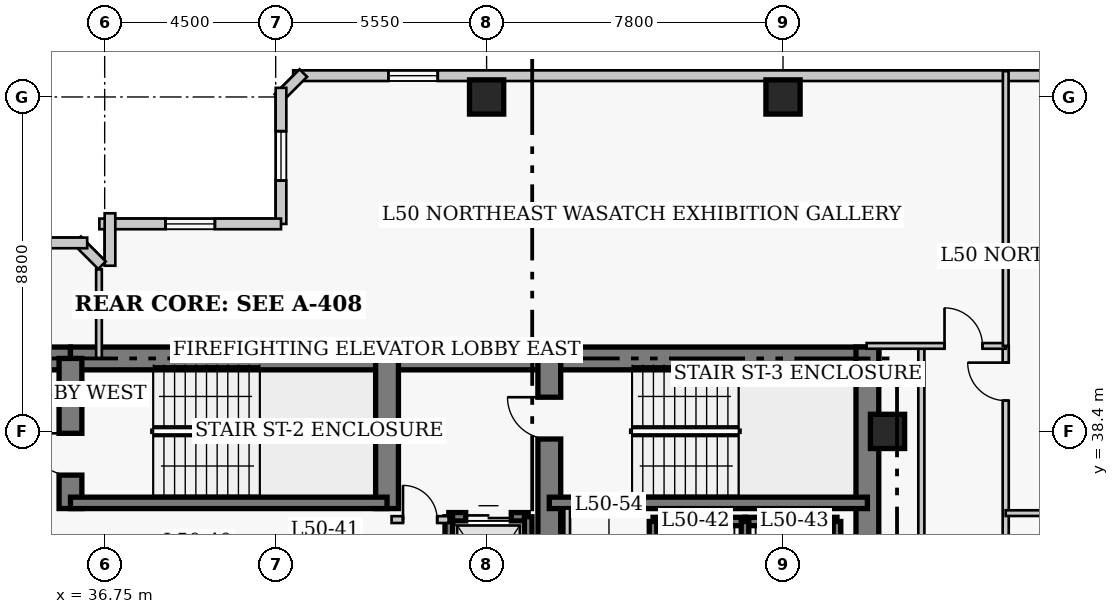
"""IFC4 building model, lengths in metres.
Left out: names, types, materials, properties, quantities, classifications, styles, units other than length and angle.
Written with IfcOpenShell. Run it as: python <this file> out.ifc"""

import sys

from ifc_helpers import new_model, si_unit, direction, frame, frame_2d, origin, origin_2d, place, context, subcontext, project, spatial, rectangle, extrude, element, fill, save


model = new_model("IFC4")
c1 = context("Model", 3, precision=1e-05, world=origin(), true_north=direction((0.0, 1.0)))
c2 = subcontext(c1, "Body", "Model", "MODEL_VIEW")
j1 = project(units=[si_unit("LENGTHUNIT", "METRE"), si_unit("PLANEANGLEUNIT", "RADIAN")], contexts=[c1])
p1 = place(None, origin())
s1 = spatial("IfcSite", under=j1, at=p1, CompositionType="ELEMENT")
p2 = place(p1, origin())
s2 = spatial("IfcBuilding", under=s1, at=p2, CompositionType="ELEMENT")
p3 = place(p2, frame((0.0, 0.0, 200.7)))
s3 = spatial("IfcBuildingStorey", under=s2, at=p3, CompositionType="ELEMENT", Elevation=200.7)
p4 = place(p3, frame((21.6, 40.32, 0.0), z_axis=(0.0, 0.0, 1.0), x_axis=(1.0, 0.0, 0.0)))
e1 = element("IfcWall", 1, at=p4, inside=s3, PredefinedType="SHEAR", context=c2, shape_type="SweptSolid", body=[
    extrude(rectangle(XDim=14.25, YDim=0.6, at=frame_2d((7.125, 0.0))), origin(), (0.0, 0.0, 1.0), 3.9),
])
p5 = place(p3, frame((35.85, 40.32, 0.0), z_axis=(0.0, 0.0, 1.0), x_axis=(1.0, 0.0, 0.0)))
e2 = element("IfcWall", 2, at=p5, inside=s3, PredefinedType="SHEAR", context=c2, shape_type="SweptSolid", body=[
    extrude(rectangle(XDim=12.6, YDim=0.6, at=frame_2d((6.3, 0.0))), origin(), (0.0, 0.0, 1.0), 3.9),
])
p6 = place(p3, frame((48.45, 40.32, 0.0), z_axis=(0.0, 0.0, 1.0), x_axis=(1.0, 0.0, 0.0)))
e3 = element("IfcWall", 3, at=p6, inside=s3, PredefinedType="SHEAR", context=c2, shape_type="SweptSolid", body=[
    extrude(rectangle(XDim=8.67, YDim=0.6, at=frame_2d((4.335, 0.0))), origin(), (0.0, 0.0, 1.0), 3.9),
])
p7 = place(p3, frame((56.82, 27.05, 0.0), z_axis=(0.0, 0.0, 1.0), x_axis=(0.0, 1.0, 0.0)))
e4 = element("IfcWall", 4, at=p7, inside=s3, PredefinedType="SHEAR", context=c2, shape_type="SweptSolid", body=[
    extrude(rectangle(XDim=13.57, YDim=0.6, at=frame_2d((6.785, 0.0))), origin(), (0.0, 0.0, 1.0), 3.9),
])
p8 = place(p3, frame((35.85, 36.37, 0.0), z_axis=(0.0, 0.0, 1.0), x_axis=(0.0, 1.0, 0.0)))
e5 = element("IfcWall", 5, at=p8, inside=s3, PredefinedType="SHEAR", context=c2, shape_type="SweptSolid", body=[
    extrude(rectangle(XDim=3.95, YDim=0.6, at=frame_2d((1.975, 0.0))), origin(), (0.0, 0.0, 1.0), 3.9),
])
p9 = place(p8, frame((0.88, 0.0, 0.0)))
e6 = element("IfcOpeningElement", 6, at=p9, cuts=e5, PredefinedType="OPENING", context=c2, shape_type="SweptSolid", body=[
    extrude(rectangle(XDim=1.1, YDim=2.15, at=frame_2d((0.55, 1.075))), frame((0.0, 0.31, 0.0), z_axis=(0.0, -1.0, 0.0), x_axis=(1.0, 0.0, 0.0)), (0.0, 0.0, 1.0), 0.62),
])
p10 = place(p3, frame((44.18, 36.37, 0.0), z_axis=(0.0, 0.0, 1.0), x_axis=(0.0, 1.0, 0.0)))
e7 = element("IfcWall", 7, at=p10, inside=s3, PredefinedType="SHEAR", context=c2, shape_type="SweptSolid", body=[
    extrude(rectangle(XDim=3.95, YDim=0.6, at=frame_2d((1.975, 0.0))), origin(), (0.0, 0.0, 1.0), 3.9),
])
p11 = place(p3, frame((48.45, 32.45, 0.0), z_axis=(0.0, 0.0, 1.0), x_axis=(0.0, 1.0, 0.0)))
e8 = element("IfcWall", 8, at=p11, inside=s3, PredefinedType="SHEAR", context=c2, shape_type="SweptSolid", body=[
    extrude(rectangle(XDim=7.87, YDim=0.6, at=frame_2d((3.935, 0.0))), origin(), (0.0, 0.0, 1.0), 3.9),
])
p12 = place(p11, frame((5.75, 0.0, 0.0)))
e9 = element("IfcOpeningElement", 9, at=p12, cuts=e8, PredefinedType="OPENING", context=c2, shape_type="SweptSolid", body=[
    extrude(rectangle(XDim=1.1, YDim=2.15, at=frame_2d((0.55, 1.075))), frame((0.0, 0.31, 0.0), z_axis=(0.0, -1.0, 0.0), x_axis=(1.0, 0.0, 0.0)), (0.0, 0.0, 1.0), 0.62),
])
p13 = place(p3, frame((35.85, 36.52, 0.0), z_axis=(0.0, 0.0, 1.0), x_axis=(1.0, 0.0, 0.0)))
e10 = element("IfcWall", 10, at=p13, inside=s3, PredefinedType="SHEAR", context=c2, shape_type="SweptSolid", body=[
    extrude(rectangle(XDim=8.33, YDim=0.3, at=frame_2d((4.165, 0.0))), origin(), (0.0, 0.0, 1.0), 3.9),
])
p14 = place(p3, frame((48.45, 36.52, 0.0), z_axis=(0.0, 0.0, 1.0), x_axis=(1.0, 0.0, 0.0)))
e11 = element("IfcWall", 11, at=p14, inside=s3, PredefinedType="SHEAR", context=c2, shape_type="SweptSolid", body=[
    extrude(rectangle(XDim=8.37, YDim=0.3, at=frame_2d((4.185, 0.0))), origin(), (0.0, 0.0, 1.0), 3.9),
])
for number, where, z_axis, x_axis in (
    (12, (46.8, 47.2, 0.0), (0.0, 0.0, 1.0), (1.0, 0.0, 0.0)),
    (13, (54.6, 47.2, 0.0), (0.0, 0.0, 1.0), (1.0, 0.0, 0.0)),
    (14, (57.35, 38.4, 0.0), (0.0, 0.0, 1.0), (1.0, 0.0, 0.0)),
):
    element("IfcColumn", number, at=place(p3, frame(where, z_axis=z_axis, x_axis=x_axis)), inside=s3, PredefinedType="COLUMN", context=c2, shape_type="SweptSolid", body=[
        extrude(rectangle(XDim=0.9, YDim=0.9, at=origin_2d()), origin(), (0.0, 0.0, 1.0), 3.9),
    ])
p15 = place(p3, frame((67.54, 47.76, 0.0), z_axis=(0.0, 0.0, 1.0), x_axis=(-1.0, 0.0, 0.0)))
e15 = element("IfcWall", 15, at=p15, inside=s3, PredefinedType="SOLIDWALL", context=c2, shape_type="SweptSolid", body=[
    extrude(rectangle(XDim=25.83, YDim=0.28, at=frame_2d((12.915, 0.0))), origin(), (0.0, 0.0, 1.0), 3.65),
])
p16 = place(p15, frame((3.655, 0.0, 0.85)))
e16 = element("IfcOpeningElement", 16, at=p16, cuts=e15, PredefinedType="OPENING", context=c2, shape_type="SweptSolid", body=[
    extrude(rectangle(XDim=1.3, YDim=1.7, at=frame_2d((0.65, 0.85))), frame((0.0, 0.15, 0.0), z_axis=(0.0, -1.0, 0.0), x_axis=(1.0, 0.0, 0.0)), (0.0, 0.0, 1.0), 0.3),
])
p17 = place(p15, frame((22.025, 0.0, 0.85)))
e17 = element("IfcOpeningElement", 17, at=p17, cuts=e15, PredefinedType="OPENING", context=c2, shape_type="SweptSolid", body=[
    extrude(rectangle(XDim=1.3, YDim=1.7, at=frame_2d((0.65, 0.85))), frame((0.0, 0.15, 0.0), z_axis=(0.0, -1.0, 0.0), x_axis=(1.0, 0.0, 0.0)), (0.0, 0.0, 1.0), 0.3),
])
p18 = place(p3, frame((41.977, 47.829, 0.0), z_axis=(0.0, 0.0, 1.0), x_axis=(-0.706975312048, -0.707238225886, 0.0)))
e18 = element("IfcWall", 18, at=p18, inside=s3, PredefinedType="SOLIDWALL", context=c2, shape_type="SweptSolid", body=[
    extrude(rectangle(XDim=0.929, YDim=0.28, at=frame_2d((0.464, 0.0))), origin(), (0.0, 0.0, 1.0), 3.65),
])
p19 = place(p3, frame((41.39, 47.44, 0.0), z_axis=(0.0, 0.0, 1.0), x_axis=(0.0, -1.0, 0.0)))
e19 = element("IfcWall", 19, at=p19, inside=s3, PredefinedType="SOLIDWALL", context=c2, shape_type="SweptSolid", body=[
    extrude(rectangle(XDim=3.58, YDim=0.28, at=frame_2d((1.79, 0.0))), origin(), (0.0, 0.0, 1.0), 3.65),
])
p20 = place(p19, frame((1.14, 0.0, 0.85)))
e20 = element("IfcOpeningElement", 20, at=p20, cuts=e19, PredefinedType="OPENING", context=c2, shape_type="SweptSolid", body=[
    extrude(rectangle(XDim=1.3, YDim=1.7, at=frame_2d((0.65, 0.85))), frame((0.0, 0.15, 0.0), z_axis=(0.0, -1.0, 0.0), x_axis=(1.0, 0.0, 0.0)), (0.0, 0.0, 1.0), 0.3),
])
p21 = place(p3, frame((41.39, 43.86, 0.0), z_axis=(0.0, 0.0, 1.0), x_axis=(-1.0, 0.0, 0.0)))
e21 = element("IfcWall", 21, at=p21, inside=s3, PredefinedType="SOLIDWALL", context=c2, shape_type="SweptSolid", body=[
    extrude(rectangle(XDim=4.78, YDim=0.28, at=frame_2d((2.39, 0.0))), origin(), (0.0, 0.0, 1.0), 3.65),
])
p22 = place(p21, frame((1.74, 0.0, 0.85)))
e22 = element("IfcOpeningElement", 22, at=p22, cuts=e21, PredefinedType="OPENING", context=c2, shape_type="SweptSolid", body=[
    extrude(rectangle(XDim=1.3, YDim=1.7, at=frame_2d((0.65, 0.85))), frame((0.0, 0.15, 0.0), z_axis=(0.0, -1.0, 0.0), x_axis=(1.0, 0.0, 0.0)), (0.0, 0.0, 1.0), 0.3),
])
p23 = place(p3, frame((36.89, 44.14, 0.0), z_axis=(0.0, 0.0, 1.0), x_axis=(0.0, -1.0, 0.0)))
e23 = element("IfcWall", 23, at=p23, inside=s3, PredefinedType="SOLIDWALL", context=c2, shape_type="SweptSolid", body=[
    extrude(rectangle(XDim=1.38, YDim=0.28, at=frame_2d((0.69, 0.0))), origin(), (0.0, 0.0, 1.0), 3.65),
])
p24 = place(p3, frame((36.679, 42.773, 0.0), z_axis=(0.0, 0.0, 1.0), x_axis=(-0.707106781187, 0.707106781187, 0.0)))
e24 = element("IfcWall", 24, at=p24, inside=s3, PredefinedType="SOLIDWALL", context=c2, shape_type="SweptSolid", body=[
    extrude(rectangle(XDim=0.928, YDim=0.28, at=frame_2d((0.464, 0.0))), origin(), (0.0, 0.0, 1.0), 3.65),
])
p25 = place(p3, frame((36.29, 43.36, 0.0), z_axis=(0.0, 0.0, 1.0), x_axis=(-1.0, 0.0, 0.0)))
e25 = element("IfcWall", 25, at=p25, inside=s3, PredefinedType="SOLIDWALL", context=c2, shape_type="SweptSolid", body=[
    extrude(rectangle(XDim=25.83, YDim=0.28, at=frame_2d((12.915, 0.0))), origin(), (0.0, 0.0, 1.0), 3.65),
])
p26 = place(p25, frame((3.005, 0.0, 0.85)))
e26 = element("IfcOpeningElement", 26, at=p26, cuts=e25, PredefinedType="OPENING", context=c2, shape_type="SweptSolid", body=[
    extrude(rectangle(XDim=1.3, YDim=1.7, at=frame_2d((0.65, 0.85))), frame((0.0, 0.15, 0.0), z_axis=(0.0, -1.0, 0.0), x_axis=(1.0, 0.0, 0.0)), (0.0, 0.0, 1.0), 0.3),
])
p27 = place(p25, frame((12.265, 0.0, 0.85)))
e27 = element("IfcOpeningElement", 27, at=p27, cuts=e25, PredefinedType="OPENING", context=c2, shape_type="SweptSolid", body=[
    extrude(rectangle(XDim=1.3, YDim=1.7, at=frame_2d((0.65, 0.85))), frame((0.0, 0.15, 0.0), z_axis=(0.0, -1.0, 0.0), x_axis=(1.0, 0.0, 0.0)), (0.0, 0.0, 1.0), 0.3),
])
p28 = place(p25, frame((20.875, 0.0, 0.85)))
e28 = element("IfcOpeningElement", 28, at=p28, cuts=e25, PredefinedType="OPENING", context=c2, shape_type="SweptSolid", body=[
    extrude(rectangle(XDim=1.3, YDim=1.7, at=frame_2d((0.65, 0.85))), frame((0.0, 0.15, 0.0), z_axis=(0.0, -1.0, 0.0), x_axis=(1.0, 0.0, 0.0)), (0.0, 0.0, 1.0), 0.3),
])
p29 = place(p3, frame((51.18, 36.03, 0.0), z_axis=(0.0, 0.0, 1.0), x_axis=(1.0, 0.0, 0.0)))
e29 = element("IfcWall", 29, at=p29, inside=s3, PredefinedType="SHEAR", context=c2, shape_type="SweptSolid", body=[
    extrude(rectangle(XDim=2.42, YDim=0.22, at=frame_2d((1.21, 0.0))), origin(), (0.0, 0.0, 1.0), 3.9),
])
p30 = place(p3, frame((51.18, 33.17, 0.0), z_axis=(0.0, 0.0, 1.0), x_axis=(0.0, 1.0, 0.0)))
e30 = element("IfcWall", 30, at=p30, inside=s3, PredefinedType="SHEAR", context=c2, shape_type="SweptSolid", body=[
    extrude(rectangle(XDim=2.86, YDim=0.2, at=frame_2d((1.43, 0.0))), origin(), (0.0, 0.0, 1.0), 3.9),
])
p31 = place(p3, frame((53.6, 36.03, 0.0), z_axis=(0.0, 0.0, 1.0), x_axis=(1.0, 0.0, 0.0)))
e31 = element("IfcWall", 31, at=p31, inside=s3, PredefinedType="SHEAR", context=c2, shape_type="SweptSolid", body=[
    extrude(rectangle(XDim=2.42, YDim=0.22, at=frame_2d((1.21, 0.0))), origin(), (0.0, 0.0, 1.0), 3.9),
])
for number, where, z_axis, x_axis in (
    (32, (53.6, 33.17, 0.0), (0.0, 0.0, 1.0), (0.0, 1.0, 0.0)),
    (33, (56.02, 33.17, 0.0), (0.0, 0.0, 1.0), (0.0, 1.0, 0.0)),
):
    element("IfcWall", number, at=place(p3, frame(where, z_axis=z_axis, x_axis=x_axis)), inside=s3, PredefinedType="SHEAR", context=c2, shape_type="SweptSolid", body=[
        extrude(rectangle(XDim=2.86, YDim=0.2, at=frame_2d((1.43, 0.0))), origin(), (0.0, 0.0, 1.0), 3.9),
    ])
p32 = place(p3, frame((45.805, 36.155, 0.0), z_axis=(0.0, 0.0, 1.0), x_axis=(1.0, 0.0, 0.0)))
e34 = element("IfcWall", 34, at=p32, inside=s3, PredefinedType="SHEAR", context=c2, shape_type="SweptSolid", body=[
    extrude(rectangle(XDim=2.09, YDim=0.22, at=frame_2d((1.045, 0.0))), origin(), (0.0, 0.0, 1.0), 3.9),
])
p33 = place(p32, frame((0.445, 0.0, 0.0)))
e35 = element("IfcOpeningElement", 35, at=p33, cuts=e34, PredefinedType="OPENING", context=c2, shape_type="SweptSolid", body=[
    extrude(rectangle(XDim=1.2, YDim=2.15, at=frame_2d((0.6, 1.075))), frame((0.0, 0.12, 0.0), z_axis=(0.0, -1.0, 0.0), x_axis=(1.0, 0.0, 0.0)), (0.0, 0.0, 1.0), 0.24),
])
p34 = place(p3, frame((45.805, 32.65, 0.0), z_axis=(0.0, 0.0, 1.0), x_axis=(0.0, 1.0, 0.0)))
e36 = element("IfcWall", 36, at=p34, inside=s3, PredefinedType="SHEAR", context=c2, shape_type="SweptSolid", body=[
    extrude(rectangle(XDim=3.505, YDim=0.2, at=frame_2d((1.752, 0.0))), origin(), (0.0, 0.0, 1.0), 3.9),
])
p35 = place(p3, frame((47.895, 33.245, 0.0), z_axis=(0.0, 0.0, 1.0), x_axis=(0.0, 1.0, 0.0)))
e37 = element("IfcWall", 37, at=p35, inside=s3, PredefinedType="SHEAR", context=c2, shape_type="SweptSolid", body=[
    extrude(rectangle(XDim=2.91, YDim=0.2, at=frame_2d((1.455, 0.0))), origin(), (0.0, 0.0, 1.0), 3.9),
])
p36 = place(p3, frame((44.3, 36.08, 0.0), z_axis=(0.0, 0.0, 1.0), x_axis=(1.0, 0.0, 0.0)))
e38 = element("IfcWall", 38, at=p36, inside=s3, PredefinedType="PARTITIONING", context=c2, shape_type="SweptSolid", body=[
    extrude(rectangle(XDim=1.5, YDim=0.18, at=frame_2d((0.75, 0.0))), origin(), (0.0, 0.0, 1.0), 3.65),
])
p37 = place(p36, frame((0.3, 0.0, 0.0)))
e39 = element("IfcOpeningElement", 39, at=p37, cuts=e38, PredefinedType="OPENING", context=c2, shape_type="SweptSolid", body=[
    extrude(rectangle(XDim=0.9, YDim=2.15, at=frame_2d((0.45, 1.075))), frame((0.0, 0.1, 0.0), z_axis=(0.0, -1.0, 0.0), x_axis=(1.0, 0.0, 0.0)), (0.0, 0.0, 1.0), 0.2),
])
p38 = place(p3, frame((48.92, 32.75, 0.0), z_axis=(0.0, 0.0, 1.0), x_axis=(0.0, 1.0, 0.0)))
e40 = element("IfcWall", 40, at=p38, inside=s3, PredefinedType="PARTITIONING", context=c2, shape_type="SweptSolid", body=[
    extrude(rectangle(XDim=3.62, YDim=0.15, at=frame_2d((1.81, 0.0))), origin(), (0.0, 0.0, 1.0), 3.65),
])
p39 = place(p3, frame((60.46, 11.95, 0.0), z_axis=(0.0, 0.0, 1.0), x_axis=(0.0, 1.0, 0.0)))
e41 = element("IfcWall", 41, at=p39, inside=s3, PredefinedType="PARTITIONING", context=c2, shape_type="SweptSolid", body=[
    extrude(rectangle(XDim=28.7, YDim=0.16, at=frame_2d((14.35, 0.0))), origin(), (0.0, 0.0, 1.0), 3.65),
])
p40 = place(p39, frame((0.46, 0.0, 0.0)))
e42 = element("IfcOpeningElement", 42, at=p40, cuts=e41, PredefinedType="OPENING", context=c2, shape_type="SweptSolid", body=[
    extrude(rectangle(XDim=0.95, YDim=2.1, at=frame_2d((0.475, 1.05))), frame((0.0, 0.09, 0.0), z_axis=(0.0, -1.0, 0.0), x_axis=(1.0, 0.0, 0.0)), (0.0, 0.0, 1.0), 0.18),
])
p41 = place(p39, frame((20.1, 0.0, 0.0)))
e43 = element("IfcOpeningElement", 43, at=p41, cuts=e41, PredefinedType="OPENING", context=c2, shape_type="SweptSolid", body=[
    extrude(rectangle(XDim=0.95, YDim=2.1, at=frame_2d((0.475, 1.05))), frame((0.0, 0.09, 0.0), z_axis=(0.0, -1.0, 0.0), x_axis=(1.0, 0.0, 0.0)), (0.0, 0.0, 1.0), 0.18),
])
p42 = place(p39, frame((27.26, 0.0, 0.0)))
e44 = element("IfcOpeningElement", 44, at=p42, cuts=e41, PredefinedType="OPENING", context=c2, shape_type="SweptSolid", body=[
    extrude(rectangle(XDim=1.0, YDim=2.15, at=frame_2d((0.5, 1.075))), frame((0.0, 0.09, 0.0), z_axis=(0.0, -1.0, 0.0), x_axis=(1.0, 0.0, 0.0)), (0.0, 0.0, 1.0), 0.18),
])
p43 = place(p3, frame((58.24, 18.51, 0.0), z_axis=(0.0, 0.0, 1.0), x_axis=(0.0, 1.0, 0.0)))
e45 = element("IfcWall", 45, at=p43, inside=s3, PredefinedType="PARTITIONING", context=c2, shape_type="SweptSolid", body=[
    extrude(rectangle(XDim=22.14, YDim=0.16, at=frame_2d((11.07, 0.0))), origin(), (0.0, 0.0, 1.0), 3.65),
])
p44 = place(p3, frame((56.8, 40.65, 0.0), z_axis=(0.0, 0.0, 1.0), x_axis=(1.0, 0.0, 0.0)))
e46 = element("IfcWall", 46, at=p44, inside=s3, PredefinedType="PARTITIONING", context=c2, shape_type="SweptSolid", body=[
    extrude(rectangle(XDim=3.66, YDim=0.15, at=frame_2d((1.83, 0.0))), origin(), (0.0, 0.0, 1.0), 3.65),
])
p45 = place(p44, frame((2.05, 0.0, 0.0)))
e47 = element("IfcOpeningElement", 47, at=p45, cuts=e46, PredefinedType="OPENING", context=c2, shape_type="SweptSolid", body=[
    extrude(rectangle(XDim=1.0, YDim=2.15, at=frame_2d((0.5, 1.075))), frame((0.0, 0.085, 0.0), z_axis=(0.0, -1.0, 0.0), x_axis=(1.0, 0.0, 0.0)), (0.0, 0.0, 1.0), 0.17),
])
p46 = place(p3, frame((36.6, 40.32, 0.0), z_axis=(0.0, 0.0, 1.0), x_axis=(0.0, 1.0, 0.0)))
e48 = element("IfcWall", 48, at=p46, inside=s3, PredefinedType="PARTITIONING", context=c2, shape_type="SweptSolid", body=[
    extrude(rectangle(XDim=2.345, YDim=0.15, at=frame_2d((1.172, 0.0))), origin(), (0.0, 0.0, 1.0), 3.65),
])
p47 = place(p3, frame((60.46, 40.65, 0.0), z_axis=(0.0, 0.0, 1.0), x_axis=(0.0, 1.0, 0.0)))
e49 = element("IfcWall", 49, at=p47, inside=s3, PredefinedType="PARTITIONING", context=c2, shape_type="SweptSolid", body=[
    extrude(rectangle(XDim=7.23, YDim=0.15, at=frame_2d((3.615, 0.0))), origin(), (0.0, 0.0, 1.0), 3.65),
])
p48 = place(p3, frame((60.46, 36.25, 0.0), z_axis=(0.0, 0.0, 1.0), x_axis=(1.0, 0.0, 0.0)))
e50 = element("IfcWall", 50, at=p48, inside=s3, PredefinedType="PARTITIONING", context=c2, shape_type="SweptSolid", body=[
    extrude(rectangle(XDim=4.64, YDim=0.15, at=frame_2d((2.32, 0.0))), origin(), (0.0, 0.0, 1.0), 3.65),
])
p49 = place(p17, origin())
e51 = element("IfcWindow", 51, at=p49, inside=s3, PartitioningType="SINGLE_PANEL", PredefinedType="WINDOW", context=c2, shape_type="SweptSolid", body=[
    extrude(rectangle(XDim=1.3, YDim=1.7, at=frame_2d((0.65, 0.85))), frame((0.0, 0.03, 0.0), z_axis=(0.0, -1.0, 0.0), x_axis=(1.0, 0.0, 0.0)), (0.0, 0.0, 1.0), 0.06),
])
fill(e17, e51)
p50 = place(p20, origin())
e52 = element("IfcWindow", 52, at=p50, inside=s3, PartitioningType="SINGLE_PANEL", PredefinedType="WINDOW", context=c2, shape_type="SweptSolid", body=[
    extrude(rectangle(XDim=1.3, YDim=1.7, at=frame_2d((0.65, 0.85))), frame((0.0, 0.03, 0.0), z_axis=(0.0, -1.0, 0.0), x_axis=(1.0, 0.0, 0.0)), (0.0, 0.0, 1.0), 0.06),
])
fill(e20, e52)
p51 = place(p22, origin())
e53 = element("IfcWindow", 53, at=p51, inside=s3, PartitioningType="SINGLE_PANEL", PredefinedType="WINDOW", context=c2, shape_type="SweptSolid", body=[
    extrude(rectangle(XDim=1.3, YDim=1.7, at=frame_2d((0.65, 0.85))), frame((0.0, 0.03, 0.0), z_axis=(0.0, -1.0, 0.0), x_axis=(1.0, 0.0, 0.0)), (0.0, 0.0, 1.0), 0.06),
])
fill(e22, e53)
p52 = place(p33, origin())
e54 = element("IfcDoor", 54, at=p52, inside=s3, OperationType="DOUBLE_DOOR_SLIDING", PredefinedType="DOOR", context=c2, shape_type="SweptSolid", body=[
    extrude(rectangle(XDim=1.2, YDim=2.15, at=frame_2d((0.6, 1.075))), frame((0.0, 0.025, 0.0), z_axis=(0.0, -1.0, 0.0), x_axis=(1.0, 0.0, 0.0)), (0.0, 0.0, 1.0), 0.05),
])
fill(e35, e54)
p53 = place(p37, origin())
e55 = element("IfcDoor", 55, at=p53, inside=s3, OperationType="SINGLE_SWING_LEFT", PredefinedType="DOOR", context=c2, shape_type="SweptSolid", body=[
    extrude(rectangle(XDim=0.9, YDim=2.15, at=frame_2d((0.45, 1.075))), frame((0.0, 0.025, 0.0), z_axis=(0.0, -1.0, 0.0), x_axis=(1.0, 0.0, 0.0)), (0.0, 0.0, 1.0), 0.05),
])
fill(e39, e55)
p54 = place(p45, origin())
e56 = element("IfcDoor", 56, at=p54, inside=s3, OperationType="SINGLE_SWING_LEFT", PredefinedType="DOOR", context=c2, shape_type="SweptSolid", body=[
    extrude(rectangle(XDim=1.0, YDim=2.15, at=frame_2d((0.5, 1.075))), frame((0.0, 0.025, 0.0), z_axis=(0.0, -1.0, 0.0), x_axis=(1.0, 0.0, 0.0)), (0.0, 0.0, 1.0), 0.05),
])
fill(e47, e56)
p55 = place(p42, origin())
e57 = element("IfcDoor", 57, at=p55, inside=s3, OperationType="SINGLE_SWING_RIGHT", PredefinedType="DOOR", context=c2, shape_type="SweptSolid", body=[
    extrude(rectangle(XDim=1.0, YDim=2.15, at=frame_2d((0.5, 1.075))), frame((0.0, 0.025, 0.0), z_axis=(0.0, -1.0, 0.0), x_axis=(1.0, 0.0, 0.0)), (0.0, 0.0, 1.0), 0.05),
])
fill(e44, e57)
p56 = place(p9, origin())
e58 = element("IfcDoor", 58, at=p56, inside=s3, OperationType="SINGLE_SWING_RIGHT", PredefinedType="DOOR", context=c2, shape_type="SweptSolid", body=[
    extrude(rectangle(XDim=1.1, YDim=2.15, at=frame_2d((0.55, 1.075))), frame((0.0, 0.025, 0.0), z_axis=(0.0, -1.0, 0.0), x_axis=(1.0, 0.0, 0.0)), (0.0, 0.0, 1.0), 0.05),
])
fill(e6, e58)
p57 = place(p12, origin())
e59 = element("IfcDoor", 59, at=p57, inside=s3, OperationType="SINGLE_SWING_RIGHT", PredefinedType="DOOR", context=c2, shape_type="SweptSolid", body=[
    extrude(rectangle(XDim=1.1, YDim=2.15, at=frame_2d((0.55, 1.075))), frame((0.0, 0.025, 0.0), z_axis=(0.0, -1.0, 0.0), x_axis=(1.0, 0.0, 0.0)), (0.0, 0.0, 1.0), 0.05),
])
fill(e9, e59)
save(model, sys.argv[1])
